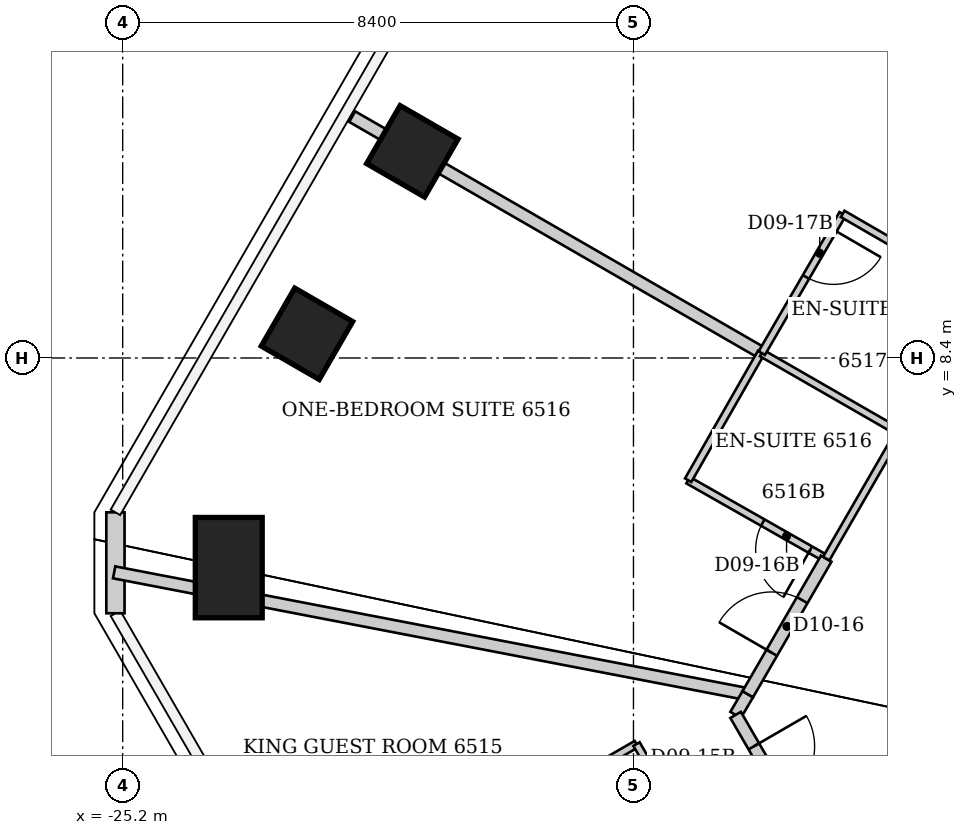
"""IFC4 building model, lengths in metres.
Left out: names, types, materials, properties, quantities, classifications, styles, units other than length and angle.
Written with IfcOpenShell. Run it as: python <this file> out.ifc"""

import sys

from ifc_helpers import new_model, si_unit, direction, frame, frame_2d, origin, origin_2d, place, context, subcontext, project, spatial, rectangle, extrude, element, fill, save


model = new_model("IFC4")
c1 = context("Model", 3, precision=1e-05, world=origin(), true_north=direction((0.0, 1.0)))
c2 = subcontext(c1, "Body", "Model", "MODEL_VIEW")
j1 = project(units=[si_unit("LENGTHUNIT", "METRE"), si_unit("PLANEANGLEUNIT", "RADIAN")], contexts=[c1])
p1 = place(None, origin())
s1 = spatial("IfcSite", under=j1, at=p1, CompositionType="ELEMENT")
p2 = place(p1, origin())
s2 = spatial("IfcBuilding", under=s1, at=p2, CompositionType="ELEMENT")
p3 = place(p2, frame((0.0, 0.0, 260.8)))
s3 = spatial("IfcBuildingStorey", under=s2, at=p3, CompositionType="ELEMENT", Elevation=260.8)
p4 = place(p3, frame((-22.108, 1.159, 0.0), z_axis=(0.0, 0.0, 1.0), x_axis=(-0.866025403784, -0.5, 0.0)))
e1 = element("IfcColumn", 1, at=p4, inside=s3, PredefinedType="COLUMN", context=c2, shape_type="SweptSolid", body=[
    extrude(rectangle(XDim=1.1, YDim=1.1, at=origin_2d()), origin(), (0.0, 0.0, 1.0), 3.8),
])
p5 = place(p3, frame((-23.456, 4.952, 0.0), z_axis=(0.0, 0.0, 1.0), x_axis=(-1.0, 0.0, 0.0)))
e2 = element("IfcColumn", 2, at=p5, inside=s3, PredefinedType="COLUMN", context=c2, shape_type="SweptSolid", body=[
    extrude(rectangle(XDim=1.1, YDim=1.65, at=origin_2d()), origin(), (0.0, 0.0, 1.0), 3.8),
])
for number, where, z_axis, x_axis in (
    (3, (-22.169, 8.798, 0.0), (0.0, 0.0, 1.0), (-0.866, 0.5, 0.0)),
    (4, (-20.437, 11.799, 0.0), (0.0, 0.0, 1.0), (-0.866, 0.5, 0.0)),
):
    element("IfcColumn", number, at=place(p3, frame(where, z_axis=z_axis, x_axis=x_axis)), inside=s3, PredefinedType="COLUMN", context=c2, shape_type="SweptSolid", body=[
        extrude(rectangle(XDim=1.1, YDim=1.1, at=origin_2d()), origin(), (0.0, 0.0, 1.0), 3.8),
    ])
p6 = place(p3, frame((-25.319, 4.202, 0.0), z_axis=(0.0, 0.0, 1.0), x_axis=(0.0, 1.0, 0.0)))
e5 = element("IfcWall", 5, at=p6, inside=s3, PredefinedType="SOLIDWALL", context=c2, shape_type="SweptSolid", body=[
    extrude(rectangle(XDim=1.66, YDim=0.3, at=frame_2d((0.83, 0.0))), origin(), (0.0, 0.0, 1.0), 3.64),
])
p7 = place(p3, frame((-25.341, 4.874, 0.0), z_axis=(0.0, 0.0, 1.0), x_axis=(0.982001168061, -0.188874841966, 0.0)))
e6 = element("IfcWall", 6, at=p7, inside=s3, PredefinedType="PARTITIONING", context=c2, shape_type="SweptSolid", body=[
    extrude(rectangle(XDim=10.557, YDim=0.2, at=frame_2d((5.278, 0.0))), origin(), (0.0, 0.0, 1.0), 3.64),
])
p8 = place(p3, frame((-21.426, 12.37, 0.0), z_axis=(0.0, 0.0, 1.0), x_axis=(0.866202335538, -0.499693419917, 0.0)))
e7 = element("IfcWall", 7, at=p8, inside=s3, PredefinedType="PARTITIONING", context=c2, shape_type="SweptSolid", body=[
    extrude(rectangle(XDim=7.765, YDim=0.2, at=frame_2d((3.883, 0.0))), origin(), (0.0, 0.0, 1.0), 2.878),
])
p9 = place(p3, frame((-16.89, 19.507, 0.0), z_axis=(0.0, 0.0, 1.0), x_axis=(0.65416581431, -0.756351166713, 0.0)))
e8 = element("IfcWall", 8, at=p9, inside=s3, PredefinedType="PARTITIONING", context=c2, shape_type="SweptSolid", body=[
    extrude(rectangle(XDim=8.974, YDim=0.2, at=frame_2d((4.487, 0.0))), origin(), (0.0, 0.0, 1.0), 3.64),
])
p10 = place(p3, frame((-16.75, 2.05, 0.0), z_axis=(0.0, 0.0, 1.0), x_axis=(-0.866202511239, -0.499693115345, 0.0)))
e9 = element("IfcWall", 9, at=p10, inside=s3, PredefinedType="PARTITIONING", context=c2, shape_type="SweptSolid", body=[
    extrude(rectangle(XDim=2.401, YDim=0.12, at=frame_2d((1.201, 0.0))), origin(), (0.0, 0.0, 1.0), 3.64),
])
p11 = place(p3, frame((-15.9, 6.39, 0.0), z_axis=(0.0, 0.0, 1.0), x_axis=(0.869431908012, -0.494052787999, 0.0)))
e10 = element("IfcWall", 10, at=p11, inside=s3, PredefinedType="PARTITIONING", context=c2, shape_type="SweptSolid", body=[
    extrude(rectangle(XDim=2.611, YDim=0.12, at=frame_2d((1.305, 0.0))), origin(), (0.0, 0.0, 1.0), 3.64),
])
p12 = place(p11, frame((1.411, 0.0, 0.0)))
e11 = element("IfcOpeningElement", 11, at=p12, cuts=e10, PredefinedType="OPENING", context=c2, shape_type="SweptSolid", body=[
    extrude(rectangle(XDim=0.9, YDim=2.03, at=frame_2d((0.45, 1.015))), frame((0.0, 0.06, 0.0), z_axis=(0.0, -1.0, 0.0), x_axis=(1.0, 0.0, 0.0)), (0.0, 0.0, 1.0), 0.12),
])
p13 = place(p3, frame((-15.44, -0.2, 0.0), z_axis=(0.0, 0.0, 1.0), x_axis=(-0.503171227198, 0.864186736834, 0.0)))
e12 = element("IfcWall", 12, at=p13, inside=s3, PredefinedType="PARTITIONING", context=c2, shape_type="SweptSolid", body=[
    extrude(rectangle(XDim=2.604, YDim=0.12, at=frame_2d((1.302, 0.0))), origin(), (0.0, 0.0, 1.0), 3.64),
])
p14 = place(p13, frame((0.3, 0.0, 0.0)))
e13 = element("IfcOpeningElement", 13, at=p14, cuts=e12, PredefinedType="OPENING", context=c2, shape_type="SweptSolid", body=[
    extrude(rectangle(XDim=0.9, YDim=2.03, at=frame_2d((0.45, 1.015))), frame((0.0, 0.06, 0.0), z_axis=(0.0, -1.0, 0.0), x_axis=(1.0, 0.0, 0.0)), (0.0, 0.0, 1.0), 0.12),
])
p15 = place(p3, frame((-15.12, 2.53, 0.0), z_axis=(0.0, 0.0, 1.0), x_axis=(0.507290461451, 0.861775137562, 0.0)))
e14 = element("IfcWall", 14, at=p15, inside=s3, PredefinedType="PARTITIONING", context=c2, shape_type="SweptSolid", body=[
    extrude(rectangle(XDim=0.395, YDim=0.2, at=frame_2d((0.197, 0.0))), origin(), (0.0, 0.0, 1.0), 3.64),
])
p16 = place(p3, frame((-15.12, 2.53, 0.0), z_axis=(0.0, 0.0, 1.0), x_axis=(0.501088872721, -0.865395829453, 0.0)))
e15 = element("IfcWall", 15, at=p16, inside=s3, PredefinedType="PARTITIONING", context=c2, shape_type="SweptSolid", body=[
    extrude(rectangle(XDim=2.195, YDim=0.2, at=frame_2d((1.098, 0.0))), origin(), (0.0, 0.0, 1.0), 3.64),
])
p17 = place(p16, frame((0.598, 0.0, 0.0)))
e16 = element("IfcOpeningElement", 16, at=p17, cuts=e15, PredefinedType="OPENING", context=c2, shape_type="SweptSolid", body=[
    extrude(rectangle(XDim=1.0, YDim=2.13, at=frame_2d((0.5, 1.065))), frame((0.0, 0.1, 0.0), z_axis=(0.0, -1.0, 0.0), x_axis=(1.0, 0.0, 0.0)), (0.0, 0.0, 1.0), 0.2),
])
p18 = place(p3, frame((-14.92, 2.87, 0.0), z_axis=(0.0, 0.0, 1.0), x_axis=(0.500714932888, 0.865612243434, 0.0)))
e17 = element("IfcWall", 17, at=p18, inside=s3, PredefinedType="PARTITIONING", context=c2, shape_type="SweptSolid", body=[
    extrude(rectangle(XDim=2.576, YDim=0.2, at=frame_2d((1.288, 0.0))), origin(), (0.0, 0.0, 1.0), 3.64),
])
p19 = place(p18, frame((0.788, 0.0, 0.0)))
e18 = element("IfcOpeningElement", 18, at=p19, cuts=e17, PredefinedType="OPENING", context=c2, shape_type="SweptSolid", body=[
    extrude(rectangle(XDim=1.0, YDim=2.13, at=frame_2d((0.5, 1.065))), frame((0.0, 0.1, 0.0), z_axis=(0.0, -1.0, 0.0), x_axis=(1.0, 0.0, 0.0)), (0.0, 0.0, 1.0), 0.2),
])
p20 = place(p3, frame((-14.7, 8.49, 0.0), z_axis=(0.0, 0.0, 1.0), x_axis=(-0.496106327528, -0.868261776072, 0.0)))
e19 = element("IfcWall", 19, at=p20, inside=s3, PredefinedType="PARTITIONING", context=c2, shape_type="SweptSolid", body=[
    extrude(rectangle(XDim=2.419, YDim=0.12, at=frame_2d((1.209, 0.0))), origin(), (0.0, 0.0, 1.0), 3.64),
])
p21 = place(p3, frame((-14.69, 8.48, 0.0), z_axis=(0.0, 0.0, 1.0), x_axis=(0.866816256489, -0.498627694264, 0.0)))
e20 = element("IfcWall", 20, at=p21, inside=s3, PredefinedType="PARTITIONING", context=c2, shape_type="SweptSolid", body=[
    extrude(rectangle(XDim=2.607, YDim=0.12, at=frame_2d((1.304, 0.0))), origin(), (0.0, 0.0, 1.0), 2.878),
])
p22 = place(p3, frame((-13.63, 5.1, 0.0), z_axis=(0.0, 0.0, 1.0), x_axis=(0.499737123639, 0.866177122335, 0.0)))
e21 = element("IfcWall", 21, at=p22, inside=s3, PredefinedType="PARTITIONING", context=c2, shape_type="SweptSolid", body=[
    extrude(rectangle(XDim=2.401, YDim=0.12, at=frame_2d((1.201, 0.0))), origin(), (0.0, 0.0, 1.0), 3.64),
])
p23 = place(p3, frame((-13.36, 10.77, 0.0), z_axis=(0.0, 0.0, 1.0), x_axis=(-0.502173326652, -0.864766991738, 0.0)))
e22 = element("IfcWall", 22, at=p23, inside=s3, PredefinedType="PARTITIONING", context=c2, shape_type="SweptSolid", body=[
    extrude(rectangle(XDim=2.648, YDim=0.12, at=frame_2d((1.324, 0.0))), origin(), (0.0, 0.0, 1.0), 3.64),
])
p24 = place(p23, frame((0.3, 0.0, 0.0)))
e23 = element("IfcOpeningElement", 23, at=p24, cuts=e22, PredefinedType="OPENING", context=c2, shape_type="SweptSolid", body=[
    extrude(rectangle(XDim=0.9, YDim=2.03, at=frame_2d((0.45, 1.015))), frame((0.0, 0.06, 0.0), z_axis=(0.0, -1.0, 0.0), x_axis=(1.0, 0.0, 0.0)), (0.0, 0.0, 1.0), 0.12),
])
p25 = place(p3, frame((-11.2, 9.52, 0.0), z_axis=(0.0, 0.0, 1.0), x_axis=(-0.865533423938, 0.500851167559, 0.0)))
e24 = element("IfcWall", 24, at=p25, inside=s3, PredefinedType="PARTITIONING", context=c2, shape_type="SweptSolid", body=[
    extrude(rectangle(XDim=2.496, YDim=0.12, at=frame_2d((1.248, 0.0))), origin(), (0.0, 0.0, 1.0), 3.64),
])
p26 = place(p17, origin())
e25 = element("IfcDoor", 25, at=p26, inside=s3, OperationType="SINGLE_SWING_LEFT", PredefinedType="DOOR", context=c2, shape_type="SweptSolid", body=[
    extrude(rectangle(XDim=1.0, YDim=2.13, at=frame_2d((0.5, 1.065))), frame((0.0, 0.025, 0.0), z_axis=(0.0, -1.0, 0.0), x_axis=(1.0, 0.0, 0.0)), (0.0, 0.0, 1.0), 0.05),
])
fill(e16, e25)
p27 = place(p19, origin())
e26 = element("IfcDoor", 26, at=p27, inside=s3, OperationType="SINGLE_SWING_LEFT", PredefinedType="DOOR", context=c2, shape_type="SweptSolid", body=[
    extrude(rectangle(XDim=1.0, YDim=2.13, at=frame_2d((0.5, 1.065))), frame((0.0, 0.025, 0.0), z_axis=(0.0, -1.0, 0.0), x_axis=(1.0, 0.0, 0.0)), (0.0, 0.0, 1.0), 0.05),
])
fill(e18, e26)
p28 = place(p12, origin())
e27 = element("IfcDoor", 27, at=p28, inside=s3, OperationType="SINGLE_SWING_RIGHT", PredefinedType="DOOR", context=c2, shape_type="SweptSolid", body=[
    extrude(rectangle(XDim=0.9, YDim=2.03, at=frame_2d((0.45, 1.015))), frame((0.0, 0.025, 0.0), z_axis=(0.0, -1.0, 0.0), x_axis=(1.0, 0.0, 0.0)), (0.0, 0.0, 1.0), 0.05),
])
fill(e11, e27)
p29 = place(p24, origin())
e28 = element("IfcDoor", 28, at=p29, inside=s3, OperationType="SINGLE_SWING_LEFT", PredefinedType="DOOR", context=c2, shape_type="SweptSolid", body=[
    extrude(rectangle(XDim=0.9, YDim=2.03, at=frame_2d((0.45, 1.015))), frame((0.0, 0.025, 0.0), z_axis=(0.0, -1.0, 0.0), x_axis=(1.0, 0.0, 0.0)), (0.0, 0.0, 1.0), 0.05),
])
fill(e23, e28)
save(model, sys.argv[1])
